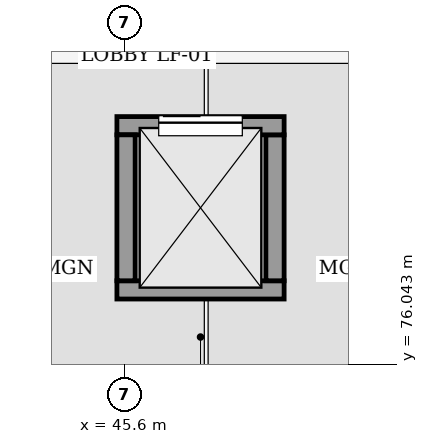
"""IFC4 building model, lengths in metres.
Left out: names, types, materials, properties, quantities, classifications, styles, units other than length and angle.
Written with IfcOpenShell. Run it as: python <this file> out.ifc"""

import sys

from ifc_helpers import new_model, si_unit, direction, frame, frame_2d, origin, place, context, subcontext, project, spatial, rectangle, extrude, element, fill, save


model = new_model("IFC4")
c1 = context("Model", 3, precision=1e-05, world=origin(), true_north=direction((0.0, 1.0)))
c2 = subcontext(c1, "Body", "Model", "MODEL_VIEW")
j1 = project(units=[si_unit("LENGTHUNIT", "METRE"), si_unit("PLANEANGLEUNIT", "RADIAN")], contexts=[c1])
p1 = place(None, origin())
s1 = spatial("IfcSite", under=j1, at=p1, CompositionType="ELEMENT")
p2 = place(p1, origin())
s2 = spatial("IfcBuilding", under=s1, at=p2, CompositionType="ELEMENT")
p3 = place(p2, frame((0.0, 0.0, -4.2)))
s3 = spatial("IfcBuildingStorey", under=s2, at=p3, CompositionType="ELEMENT", Elevation=-4.2)
p4 = place(p3, frame((47.7, 77.02, 0.0), z_axis=(0.0, 0.0, 1.0), x_axis=(-1.0, 0.0, 0.0)))
e1 = element("IfcWall", 1, at=p4, inside=s3, PredefinedType="SHEAR", context=c2, shape_type="SweptSolid", body=[
    extrude(rectangle(XDim=2.2, YDim=0.24, at=frame_2d((1.1, 0.0))), origin(), (0.0, 0.0, 1.0), 4.2),
])
p5 = place(p3, frame((47.58, 79.06, 0.0), z_axis=(0.0, 0.0, 1.0), x_axis=(0.0, -1.0, 0.0)))
e2 = element("IfcWall", 2, at=p5, inside=s3, PredefinedType="SHEAR", context=c2, shape_type="SweptSolid", body=[
    extrude(rectangle(XDim=1.92, YDim=0.24, at=frame_2d((0.96, 0.0))), origin(), (0.0, 0.0, 1.0), 4.2),
])
p6 = place(p3, frame((45.5, 79.18, 0.0), z_axis=(0.0, 0.0, 1.0), x_axis=(1.0, 0.0, 0.0)))
e3 = element("IfcWall", 3, at=p6, inside=s3, PredefinedType="SHEAR", context=c2, shape_type="SweptSolid", body=[
    extrude(rectangle(XDim=2.2, YDim=0.24, at=frame_2d((1.1, 0.0))), origin(), (0.0, 0.0, 1.0), 4.2),
])
p7 = place(p6, frame((0.55, 0.0, 0.0)))
e4 = element("IfcOpeningElement", 4, at=p7, cuts=e3, PredefinedType="OPENING", context=c2, shape_type="SweptSolid", body=[
    extrude(rectangle(XDim=1.1, YDim=2.15, at=frame_2d((0.55, 1.075))), frame((0.0, 0.13, 0.0), z_axis=(0.0, -1.0, 0.0), x_axis=(1.0, 0.0, 0.0)), (0.0, 0.0, 1.0), 0.26),
])
p8 = place(p3, frame((45.62, 77.14, 0.0), z_axis=(0.0, 0.0, 1.0), x_axis=(0.0, 1.0, 0.0)))
e5 = element("IfcWall", 5, at=p8, inside=s3, PredefinedType="SHEAR", context=c2, shape_type="SweptSolid", body=[
    extrude(rectangle(XDim=1.92, YDim=0.24, at=frame_2d((0.96, 0.0))), origin(), (0.0, 0.0, 1.0), 4.2),
])
p9 = place(p7, origin())
e6 = element("IfcDoor", 6, at=p9, inside=s3, OperationType="SLIDING_TO_LEFT", PredefinedType="DOOR", context=c2, shape_type="SweptSolid", body=[
    extrude(rectangle(XDim=1.1, YDim=2.15, at=frame_2d((0.55, 1.075))), frame((0.0, 0.025, 0.0), z_axis=(0.0, -1.0, 0.0), x_axis=(1.0, 0.0, 0.0)), (0.0, 0.0, 1.0), 0.05),
])
fill(e4, e6)
save(model, sys.argv[1])
